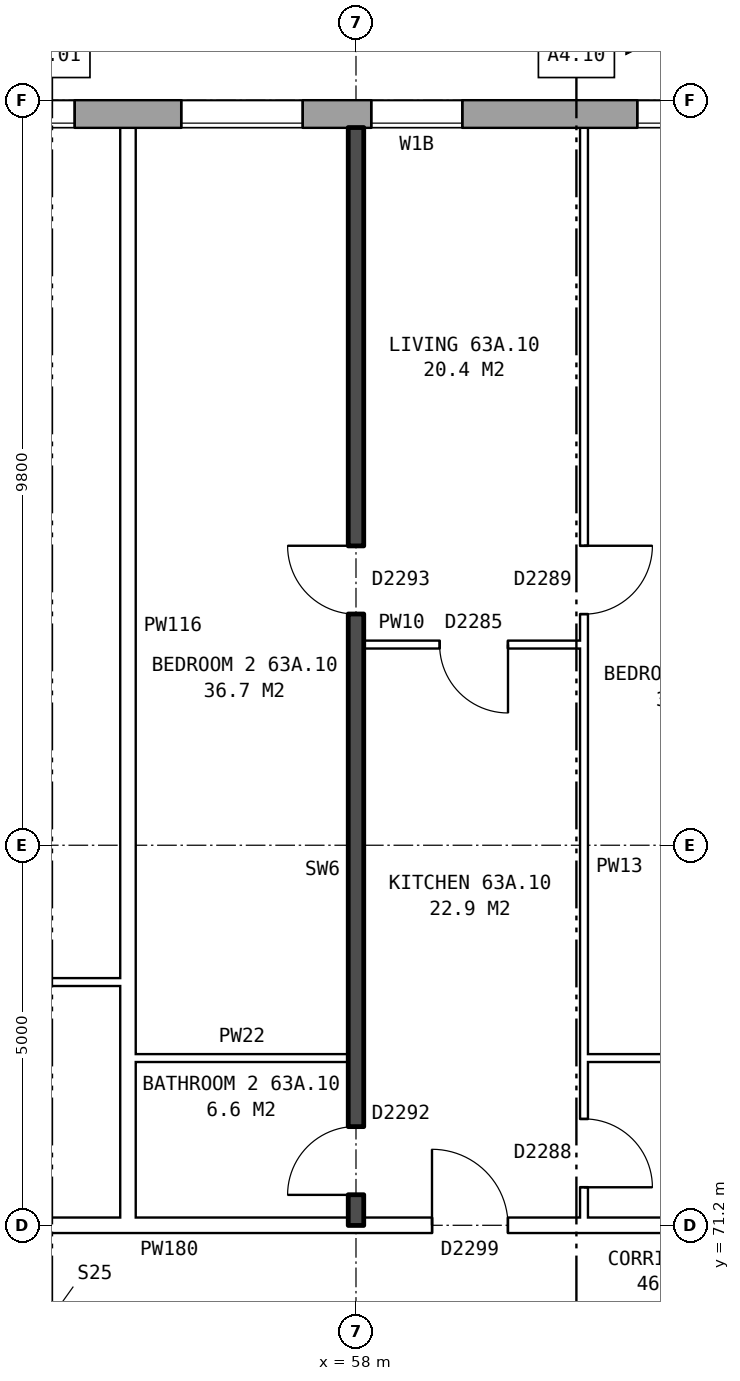
"""IFC4 building model, lengths in metres.
Left out: names, types, materials, properties, quantities, classifications, styles, units other than length and angle.
Written with IfcOpenShell. Run it as: python <this file> out.ifc"""

import sys

from ifc_helpers import new_model, si_unit, direction, frame, frame_2d, origin, place, context, subcontext, project, spatial, rectangle, extrude, element, fill, save


model = new_model("IFC4")
c1 = context("Model", 3, precision=1e-05, world=origin(), true_north=direction((0.0, 1.0)))
c2 = subcontext(c1, "Body", "Model", "MODEL_VIEW")
j1 = project(units=[si_unit("LENGTHUNIT", "METRE"), si_unit("PLANEANGLEUNIT", "RADIAN")], contexts=[c1])
p1 = place(None, origin())
s1 = spatial("IfcSite", under=j1, at=p1, CompositionType="ELEMENT")
p2 = place(p1, origin())
s2 = spatial("IfcBuilding", under=s1, at=p2, CompositionType="ELEMENT")
p3 = place(p2, frame((0.0, 0.0, 224.5)))
s3 = spatial("IfcBuildingStorey", under=s2, at=p3, CompositionType="ELEMENT", Elevation=224.5)
p4 = place(p3, frame((74.95, 85.82, 0.0), z_axis=(0.0, 0.0, 1.0), x_axis=(-1.0, 0.0, 0.0)))
e1 = element("IfcWall", 1, at=p4, inside=s3, PredefinedType="STANDARD", context=c2, shape_type="SweptSolid", body=[
    extrude(rectangle(XDim=39.875, YDim=0.36, at=frame_2d((19.938, 0.0))), origin(), (0.0, 0.0, 1.0), 2.85),
])
p5 = place(p4, frame((2.65, 0.0, 0.8)))
e2 = element("IfcOpeningElement", 2, at=p5, cuts=e1, PredefinedType="OPENING", context=c2, shape_type="SweptSolid", body=[
    extrude(rectangle(XDim=1.6, YDim=1.8, at=frame_2d((0.8, 0.9))), frame((0.0, 0.19, 0.0), z_axis=(0.0, -1.0, 0.0), x_axis=(1.0, 0.0, 0.0)), (0.0, 0.0, 1.0), 0.38),
])
p6 = place(p4, frame((5.65, 0.0, 0.8)))
e3 = element("IfcOpeningElement", 3, at=p6, cuts=e1, PredefinedType="OPENING", context=c2, shape_type="SweptSolid", body=[
    extrude(rectangle(XDim=1.6, YDim=1.8, at=frame_2d((0.8, 0.9))), frame((0.0, 0.19, 0.0), z_axis=(0.0, -1.0, 0.0), x_axis=(1.0, 0.0, 0.0)), (0.0, 0.0, 1.0), 0.38),
])
p7 = place(p4, frame((8.65, 0.0, 0.8)))
e4 = element("IfcOpeningElement", 4, at=p7, cuts=e1, PredefinedType="OPENING", context=c2, shape_type="SweptSolid", body=[
    extrude(rectangle(XDim=1.6, YDim=1.8, at=frame_2d((0.8, 0.9))), frame((0.0, 0.19, 0.0), z_axis=(0.0, -1.0, 0.0), x_axis=(1.0, 0.0, 0.0)), (0.0, 0.0, 1.0), 0.38),
])
p8 = place(p4, frame((11.65, 0.0, 0.8)))
e5 = element("IfcOpeningElement", 5, at=p8, cuts=e1, PredefinedType="OPENING", context=c2, shape_type="SweptSolid", body=[
    extrude(rectangle(XDim=1.6, YDim=1.8, at=frame_2d((0.8, 0.9))), frame((0.0, 0.19, 0.0), z_axis=(0.0, -1.0, 0.0), x_axis=(1.0, 0.0, 0.0)), (0.0, 0.0, 1.0), 0.38),
])
p9 = place(p4, frame((15.55, 0.0, 0.8)))
e6 = element("IfcOpeningElement", 6, at=p9, cuts=e1, PredefinedType="OPENING", context=c2, shape_type="SweptSolid", body=[
    extrude(rectangle(XDim=1.2, YDim=1.8, at=frame_2d((0.6, 0.9))), frame((0.0, 0.19, 0.0), z_axis=(0.0, -1.0, 0.0), x_axis=(1.0, 0.0, 0.0)), (0.0, 0.0, 1.0), 0.38),
])
p10 = place(p4, frame((17.65, 0.0, 0.8)))
e7 = element("IfcOpeningElement", 7, at=p10, cuts=e1, PredefinedType="OPENING", context=c2, shape_type="SweptSolid", body=[
    extrude(rectangle(XDim=1.6, YDim=1.8, at=frame_2d((0.8, 0.9))), frame((0.0, 0.19, 0.0), z_axis=(0.0, -1.0, 0.0), x_axis=(1.0, 0.0, 0.0)), (0.0, 0.0, 1.0), 0.38),
])
p11 = place(p4, frame((20.65, 0.0, 0.8)))
e8 = element("IfcOpeningElement", 8, at=p11, cuts=e1, PredefinedType="OPENING", context=c2, shape_type="SweptSolid", body=[
    extrude(rectangle(XDim=1.6, YDim=1.8, at=frame_2d((0.8, 0.9))), frame((0.0, 0.19, 0.0), z_axis=(0.0, -1.0, 0.0), x_axis=(1.0, 0.0, 0.0)), (0.0, 0.0, 1.0), 0.38),
])
p12 = place(p4, frame((23.65, 0.0, 0.8)))
e9 = element("IfcOpeningElement", 9, at=p12, cuts=e1, PredefinedType="OPENING", context=c2, shape_type="SweptSolid", body=[
    extrude(rectangle(XDim=1.6, YDim=1.8, at=frame_2d((0.8, 0.9))), frame((0.0, 0.19, 0.0), z_axis=(0.0, -1.0, 0.0), x_axis=(1.0, 0.0, 0.0)), (0.0, 0.0, 1.0), 0.38),
])
p13 = place(p4, frame((26.1, 0.0, 0.25)))
e10 = element("IfcOpeningElement", 10, at=p13, cuts=e1, PredefinedType="OPENING", context=c2, shape_type="SweptSolid", body=[
    extrude(rectangle(XDim=0.8, YDim=1.5, at=frame_2d((0.4, 0.75))), frame((0.0, 0.19, 0.0), z_axis=(0.0, -1.0, 0.0), x_axis=(1.0, 0.0, 0.0)), (0.0, 0.0, 1.0), 0.38),
])
p14 = place(p4, frame((29.65, 0.0, 0.8)))
e11 = element("IfcOpeningElement", 11, at=p14, cuts=e1, PredefinedType="OPENING", context=c2, shape_type="SweptSolid", body=[
    extrude(rectangle(XDim=1.6, YDim=1.8, at=frame_2d((0.8, 0.9))), frame((0.0, 0.19, 0.0), z_axis=(0.0, -1.0, 0.0), x_axis=(1.0, 0.0, 0.0)), (0.0, 0.0, 1.0), 0.38),
])
p15 = place(p4, frame((32.65, 0.0, 0.8)))
e12 = element("IfcOpeningElement", 12, at=p15, cuts=e1, PredefinedType="OPENING", context=c2, shape_type="SweptSolid", body=[
    extrude(rectangle(XDim=1.6, YDim=1.8, at=frame_2d((0.8, 0.9))), frame((0.0, 0.19, 0.0), z_axis=(0.0, -1.0, 0.0), x_axis=(1.0, 0.0, 0.0)), (0.0, 0.0, 1.0), 0.38),
])
p16 = place(p4, frame((35.65, 0.0, 0.8)))
e13 = element("IfcOpeningElement", 13, at=p16, cuts=e1, PredefinedType="OPENING", context=c2, shape_type="SweptSolid", body=[
    extrude(rectangle(XDim=1.6, YDim=1.8, at=frame_2d((0.8, 0.9))), frame((0.0, 0.19, 0.0), z_axis=(0.0, -1.0, 0.0), x_axis=(1.0, 0.0, 0.0)), (0.0, 0.0, 1.0), 0.38),
])
p17 = place(p4, frame((28.15, 0.0, 1.65)))
e14 = element("IfcOpeningElement", 14, at=p17, cuts=e1, PredefinedType="OPENING", context=c2, shape_type="SweptSolid", body=[
    extrude(rectangle(XDim=0.6, YDim=0.9, at=frame_2d((0.3, 0.45))), frame((0.0, 0.19, 0.0), z_axis=(0.0, -1.0, 0.0), x_axis=(1.0, 0.0, 0.0)), (0.0, 0.0, 1.0), 0.38),
])
p18 = place(p3, frame((44.36, 71.2, 0.0), z_axis=(0.0, 0.0, 1.0), x_axis=(1.0, 0.0, 0.0)))
e15 = element("IfcWall", 15, at=p18, inside=s3, PredefinedType="PARTITIONING", context=c2, shape_type="SweptSolid", body=[
    extrude(rectangle(XDim=19.28, YDim=0.2, at=frame_2d((9.64, 0.0))), origin(), (0.0, 0.0, 1.0), 2.85),
])
p19 = place(p18, frame((14.64, 0.0, 0.0)))
e16 = element("IfcOpeningElement", 16, at=p19, cuts=e15, PredefinedType="OPENING", context=c2, shape_type="SweptSolid", body=[
    extrude(rectangle(XDim=1.0, YDim=2.1, at=frame_2d((0.5, 1.05))), frame((0.0, 0.11, 0.0), z_axis=(0.0, -1.0, 0.0), x_axis=(1.0, 0.0, 0.0)), (0.0, 0.0, 1.0), 0.22),
])
p20 = place(p18, frame((5.64, 0.0, 0.0)))
e17 = element("IfcOpeningElement", 17, at=p20, cuts=e15, PredefinedType="OPENING", context=c2, shape_type="SweptSolid", body=[
    extrude(rectangle(XDim=1.0, YDim=2.1, at=frame_2d((0.5, 1.05))), frame((0.0, 0.11, 0.0), z_axis=(0.0, -1.0, 0.0), x_axis=(1.0, 0.0, 0.0)), (0.0, 0.0, 1.0), 0.22),
])
p21 = place(p3, frame((55.1, 73.4, 0.0), z_axis=(0.0, 0.0, 1.0), x_axis=(1.0, 0.0, 0.0)))
e18 = element("IfcWall", 18, at=p21, inside=s3, PredefinedType="PARTITIONING", context=c2, shape_type="SweptSolid", body=[
    extrude(rectangle(XDim=2.8, YDim=0.1, at=frame_2d((1.4, 0.0))), origin(), (0.0, 0.0, 1.0), 2.85),
])
p22 = place(p3, frame((61.0, 73.4, 0.0), z_axis=(0.0, 0.0, 1.0), x_axis=(1.0, 0.0, 0.0)))
e19 = element("IfcWall", 19, at=p22, inside=s3, PredefinedType="PARTITIONING", context=c2, shape_type="SweptSolid", body=[
    extrude(rectangle(XDim=2.64, YDim=0.1, at=frame_2d((1.32, 0.0))), origin(), (0.0, 0.0, 1.0), 2.85),
])
p23 = place(p3, frame((52.1, 74.4, 0.0), z_axis=(0.0, 0.0, 1.0), x_axis=(1.0, 0.0, 0.0)))
e20 = element("IfcWall", 20, at=p23, inside=s3, PredefinedType="PARTITIONING", context=c2, shape_type="SweptSolid", body=[
    extrude(rectangle(XDim=2.8, YDim=0.1, at=frame_2d((1.4, 0.0))), origin(), (0.0, 0.0, 1.0), 2.85),
])
p24 = place(p3, frame((58.1, 78.84, 0.0), z_axis=(0.0, 0.0, 1.0), x_axis=(1.0, 0.0, 0.0)))
e21 = element("IfcWall", 21, at=p24, inside=s3, PredefinedType="PARTITIONING", context=c2, shape_type="SweptSolid", body=[
    extrude(rectangle(XDim=2.9, YDim=0.1, at=frame_2d((1.45, 0.0))), origin(), (0.0, 0.0, 1.0), 2.85),
])
p25 = place(p24, frame((1.0, 0.0, 0.0)))
e22 = element("IfcOpeningElement", 22, at=p25, cuts=e21, PredefinedType="OPENING", context=c2, shape_type="SweptSolid", body=[
    extrude(rectangle(XDim=0.9, YDim=2.1, at=frame_2d((0.45, 1.05))), frame((0.0, 0.06, 0.0), z_axis=(0.0, -1.0, 0.0), x_axis=(1.0, 0.0, 0.0)), (0.0, 0.0, 1.0), 0.12),
])
p26 = place(p3, frame((55.0, 71.3, 0.0), z_axis=(0.0, 0.0, 1.0), x_axis=(0.0, 1.0, 0.0)))
e23 = element("IfcWall", 23, at=p26, inside=s3, PredefinedType="PARTITIONING", context=c2, shape_type="SweptSolid", body=[
    extrude(rectangle(XDim=14.34, YDim=0.2, at=frame_2d((7.17, 0.0))), origin(), (0.0, 0.0, 1.0), 2.85),
])
p27 = place(p3, frame((58.0, 71.2, 0.0), z_axis=(0.0, 0.0, 1.0), x_axis=(0.0, 1.0, 0.0)))
e24 = element("IfcWall", 24, at=p27, inside=s3, PredefinedType="SOLIDWALL", context=c2, shape_type="SweptSolid", body=[
    extrude(rectangle(XDim=14.44, YDim=0.2, at=frame_2d((7.22, 0.0))), origin(), (0.0, 0.0, 1.0), 2.85),
])
p28 = place(p27, frame((8.04, 0.0, 0.0)))
e25 = element("IfcOpeningElement", 25, at=p28, cuts=e24, PredefinedType="OPENING", context=c2, shape_type="SweptSolid", body=[
    extrude(rectangle(XDim=0.9, YDim=2.1, at=frame_2d((0.45, 1.05))), frame((0.0, 0.11, 0.0), z_axis=(0.0, -1.0, 0.0), x_axis=(1.0, 0.0, 0.0)), (0.0, 0.0, 1.0), 0.22),
])
p29 = place(p27, frame((0.4, 0.0, 0.0)))
e26 = element("IfcOpeningElement", 26, at=p29, cuts=e24, PredefinedType="OPENING", context=c2, shape_type="SweptSolid", body=[
    extrude(rectangle(XDim=0.9, YDim=2.1, at=frame_2d((0.45, 1.05))), frame((0.0, 0.11, 0.0), z_axis=(0.0, -1.0, 0.0), x_axis=(1.0, 0.0, 0.0)), (0.0, 0.0, 1.0), 0.22),
])
p30 = place(p3, frame((61.0, 71.3, 0.0), z_axis=(0.0, 0.0, 1.0), x_axis=(0.0, 1.0, 0.0)))
e27 = element("IfcWall", 27, at=p30, inside=s3, PredefinedType="PARTITIONING", context=c2, shape_type="SweptSolid", body=[
    extrude(rectangle(XDim=14.34, YDim=0.1, at=frame_2d((7.17, 0.0))), origin(), (0.0, 0.0, 1.0), 2.85),
])
p31 = place(p30, frame((7.94, 0.0, 0.0)))
e28 = element("IfcOpeningElement", 28, at=p31, cuts=e27, PredefinedType="OPENING", context=c2, shape_type="SweptSolid", body=[
    extrude(rectangle(XDim=0.9, YDim=2.1, at=frame_2d((0.45, 1.05))), frame((0.0, 0.06, 0.0), z_axis=(0.0, -1.0, 0.0), x_axis=(1.0, 0.0, 0.0)), (0.0, 0.0, 1.0), 0.12),
])
p32 = place(p30, frame((0.4, 0.0, 0.0)))
e29 = element("IfcOpeningElement", 29, at=p32, cuts=e27, PredefinedType="OPENING", context=c2, shape_type="SweptSolid", body=[
    extrude(rectangle(XDim=0.9, YDim=2.1, at=frame_2d((0.45, 1.05))), frame((0.0, 0.06, 0.0), z_axis=(0.0, -1.0, 0.0), x_axis=(1.0, 0.0, 0.0)), (0.0, 0.0, 1.0), 0.12),
])
p33 = place(p8, origin())
e30 = element("IfcWindow", 30, at=p33, inside=s3, PartitioningType="SINGLE_PANEL", PredefinedType="WINDOW", context=c2, shape_type="SweptSolid", body=[
    extrude(rectangle(XDim=1.6, YDim=1.8, at=frame_2d((0.8, 0.9))), frame((0.0, 0.15, 0.0), z_axis=(0.0, -1.0, 0.0), x_axis=(1.0, 0.0, 0.0)), (0.0, 0.0, 1.0), 0.06),
])
fill(e5, e30)
p34 = place(p9, origin())
e31 = element("IfcWindow", 31, at=p34, inside=s3, PartitioningType="SINGLE_PANEL", PredefinedType="WINDOW", context=c2, shape_type="SweptSolid", body=[
    extrude(rectangle(XDim=1.2, YDim=1.8, at=frame_2d((0.6, 0.9))), frame((0.0, 0.15, 0.0), z_axis=(0.0, -1.0, 0.0), x_axis=(1.0, 0.0, 0.0)), (0.0, 0.0, 1.0), 0.06),
])
fill(e6, e31)
p35 = place(p10, origin())
e32 = element("IfcWindow", 32, at=p35, inside=s3, PartitioningType="SINGLE_PANEL", PredefinedType="WINDOW", context=c2, shape_type="SweptSolid", body=[
    extrude(rectangle(XDim=1.6, YDim=1.8, at=frame_2d((0.8, 0.9))), frame((0.0, 0.15, 0.0), z_axis=(0.0, -1.0, 0.0), x_axis=(1.0, 0.0, 0.0)), (0.0, 0.0, 1.0), 0.06),
])
fill(e7, e32)
p36 = place(p11, origin())
e33 = element("IfcWindow", 33, at=p36, inside=s3, PartitioningType="SINGLE_PANEL", PredefinedType="WINDOW", context=c2, shape_type="SweptSolid", body=[
    extrude(rectangle(XDim=1.6, YDim=1.8, at=frame_2d((0.8, 0.9))), frame((0.0, 0.15, 0.0), z_axis=(0.0, -1.0, 0.0), x_axis=(1.0, 0.0, 0.0)), (0.0, 0.0, 1.0), 0.06),
])
fill(e8, e33)
p37 = place(p31, frame((0.9, 0.0, 0.0), z_axis=(0.0, 0.0, 1.0), x_axis=(-1.0, 0.0, 0.0)))
e34 = element("IfcDoor", 34, at=p37, inside=s3, OperationType="SINGLE_SWING_LEFT", PredefinedType="DOOR", context=c2, shape_type="SweptSolid", body=[
    extrude(rectangle(XDim=0.9, YDim=2.1, at=frame_2d((0.45, 1.05))), frame((0.0, 0.025, 0.0), z_axis=(0.0, -1.0, 0.0), x_axis=(1.0, 0.0, 0.0)), (0.0, 0.0, 1.0), 0.05),
])
fill(e28, e34)
p38 = place(p28, origin())
e35 = element("IfcDoor", 35, at=p38, inside=s3, OperationType="SINGLE_SWING_RIGHT", PredefinedType="DOOR", context=c2, shape_type="SweptSolid", body=[
    extrude(rectangle(XDim=0.9, YDim=2.1, at=frame_2d((0.45, 1.05))), frame((0.0, 0.025, 0.0), z_axis=(0.0, -1.0, 0.0), x_axis=(1.0, 0.0, 0.0)), (0.0, 0.0, 1.0), 0.05),
])
fill(e25, e35)
p39 = place(p19, origin())
e36 = element("IfcDoor", 36, at=p39, inside=s3, OperationType="SINGLE_SWING_LEFT", PredefinedType="DOOR", context=c2, shape_type="SweptSolid", body=[
    extrude(rectangle(XDim=1.0, YDim=2.1, at=frame_2d((0.5, 1.05))), frame((0.0, 0.025, 0.0), z_axis=(0.0, -1.0, 0.0), x_axis=(1.0, 0.0, 0.0)), (0.0, 0.0, 1.0), 0.05),
])
fill(e16, e36)
p40 = place(p25, frame((0.9, 0.0, 0.0), z_axis=(0.0, 0.0, 1.0), x_axis=(-1.0, 0.0, 0.0)))
e37 = element("IfcDoor", 37, at=p40, inside=s3, OperationType="SINGLE_SWING_LEFT", PredefinedType="DOOR", context=c2, shape_type="SweptSolid", body=[
    extrude(rectangle(XDim=0.9, YDim=2.1, at=frame_2d((0.45, 1.05))), frame((0.0, 0.025, 0.0), z_axis=(0.0, -1.0, 0.0), x_axis=(1.0, 0.0, 0.0)), (0.0, 0.0, 1.0), 0.05),
])
fill(e22, e37)
p41 = place(p32, frame((0.9, 0.0, 0.0), z_axis=(0.0, 0.0, 1.0), x_axis=(-1.0, 0.0, 0.0)))
e38 = element("IfcDoor", 38, at=p41, inside=s3, OperationType="SINGLE_SWING_RIGHT", PredefinedType="DOOR", context=c2, shape_type="SweptSolid", body=[
    extrude(rectangle(XDim=0.9, YDim=2.1, at=frame_2d((0.45, 1.05))), frame((0.0, 0.025, 0.0), z_axis=(0.0, -1.0, 0.0), x_axis=(1.0, 0.0, 0.0)), (0.0, 0.0, 1.0), 0.05),
])
fill(e29, e38)
p42 = place(p29, origin())
e39 = element("IfcDoor", 39, at=p42, inside=s3, OperationType="SINGLE_SWING_LEFT", PredefinedType="DOOR", context=c2, shape_type="SweptSolid", body=[
    extrude(rectangle(XDim=0.9, YDim=2.1, at=frame_2d((0.45, 1.05))), frame((0.0, 0.025, 0.0), z_axis=(0.0, -1.0, 0.0), x_axis=(1.0, 0.0, 0.0)), (0.0, 0.0, 1.0), 0.05),
])
fill(e26, e39)
save(model, sys.argv[1])
